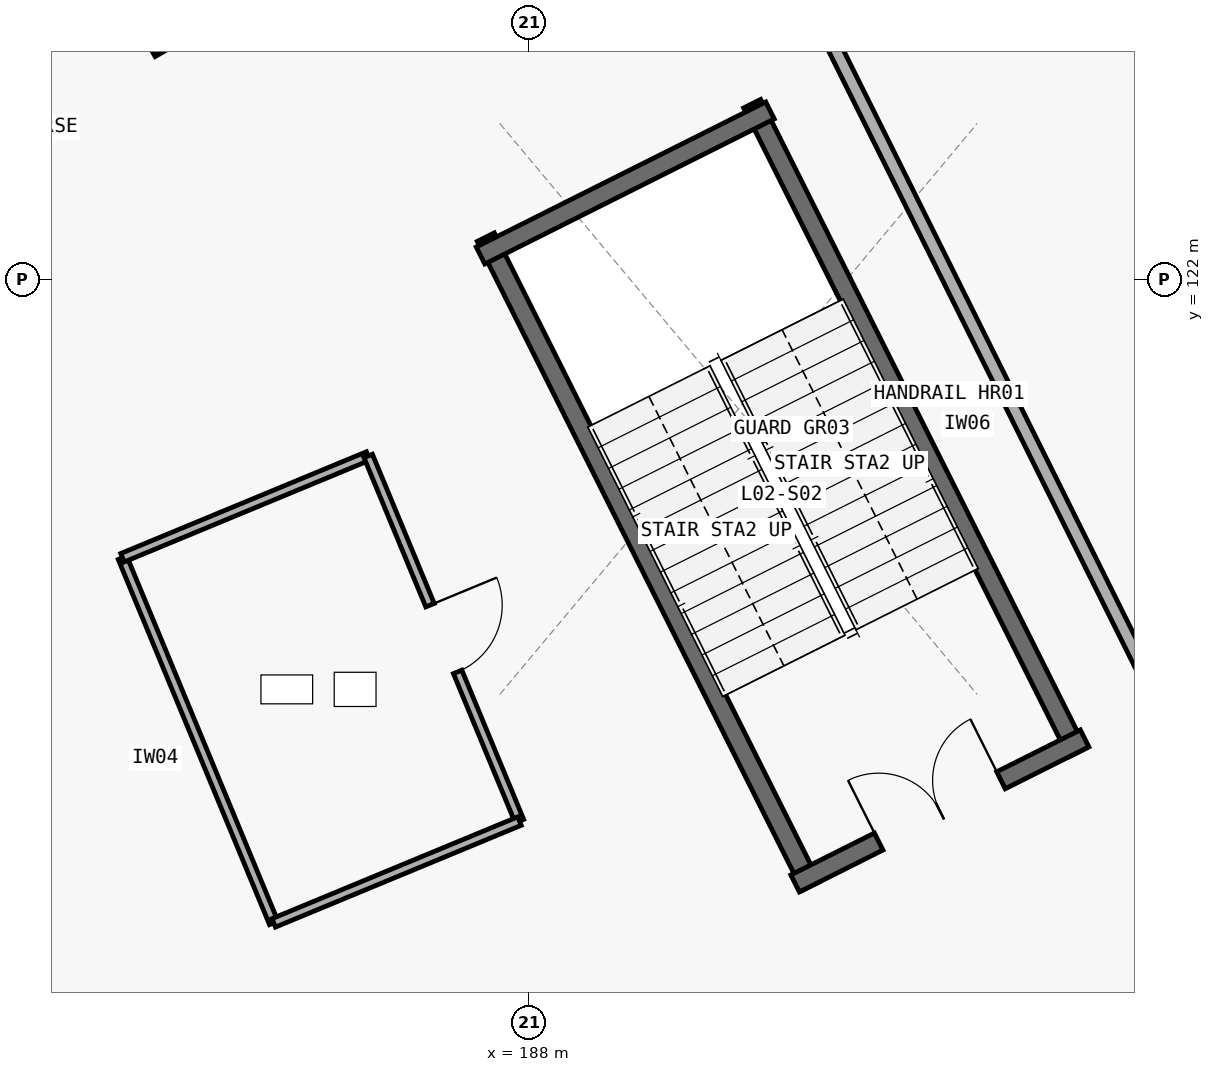
"""IFC4 building model, lengths in metres.
Left out: names, types, materials, properties, quantities, classifications, styles, units other than length and angle.
Written with IfcOpenShell. Run it as: python <this file> out.ifc"""

import sys

from ifc_helpers import new_model, si_unit, direction, frame, frame_2d, origin, origin_2d, place, context, subcontext, project, spatial, rectangle, extrude, element, fill, save


model = new_model("IFC4")
c1 = context("Model", 3, precision=1e-05, world=origin(), true_north=direction((0.0, 1.0)))
c2 = subcontext(c1, "Body", "Model", "MODEL_VIEW")
j1 = project(units=[si_unit("LENGTHUNIT", "METRE"), si_unit("PLANEANGLEUNIT", "RADIAN")], contexts=[c1])
p1 = place(None, origin())
s1 = spatial("IfcSite", under=j1, at=p1, CompositionType="ELEMENT")
p2 = place(p1, origin())
s2 = spatial("IfcBuilding", under=s1, at=p2, CompositionType="ELEMENT")
p3 = place(p2, frame((0.0, 0.0, 10.2)))
s3 = spatial("IfcBuildingStorey", under=s2, at=p3, CompositionType="ELEMENT", Elevation=10.2)
p4 = place(p3, frame((183.274, 125.65, 0.0), z_axis=(0.0, 0.0, 1.0), x_axis=(0.866025403784, 0.5, 0.0)))
e1 = element("IfcColumn", 1, at=p4, inside=s3, PredefinedType="COLUMN", context=c2, shape_type="SweptSolid", body=[
    extrude(rectangle(XDim=1.05, YDim=1.05, at=origin_2d()), origin(), (0.0, 0.0, 1.0), 4.8),
])
for number, where, z_axis, x_axis in (
    (2, (195.215, 115.774, 0.0), (0.0, 0.0, 1.0), (-0.448, 0.894, 0.0)),
    (3, (187.432, 122.557, 0.0), (0.0, 0.0, 1.0), (0.448, -0.894, 0.0)),
):
    element("IfcWall", number, at=place(p3, frame(where, z_axis=z_axis, x_axis=x_axis)), inside=s3, PredefinedType="SHEAR", context=c2, shape_type="SweptSolid", body=[
        extrude(rectangle(XDim=9.55, YDim=0.25, at=frame_2d((4.775, 0.0))), origin(), (0.0, 0.0, 1.0), 4.5),
    ])
p5 = place(p3, frame((191.502, 114.054, 0.0), z_axis=(0.0, 0.0, 1.0), x_axis=(0.89409454548, 0.447878268888, 0.0)))
e4 = element("IfcWall", 4, at=p5, inside=s3, PredefinedType="SHEAR", context=c2, shape_type="SweptSolid", body=[
    extrude(rectangle(XDim=4.26, YDim=0.25, at=frame_2d((2.13, 0.0))), origin(), (0.0, 0.0, 1.0), 4.5),
])
p6 = place(p5, frame((1.23, 0.0, 0.0)))
e5 = element("IfcOpeningElement", 5, at=p6, cuts=e4, PredefinedType="OPENING", context=c2, shape_type="SweptSolid", body=[
    extrude(rectangle(XDim=1.8, YDim=2.25, at=frame_2d((0.9, 1.125))), frame((0.0, 0.135, 0.0), z_axis=(0.0, -1.0, 0.0), x_axis=(1.0, 0.0, 0.0)), (0.0, 0.0, 1.0), 0.27),
])
p7 = place(p3, frame((191.172, 124.223, 0.0), z_axis=(0.0, 0.0, 1.0), x_axis=(-0.89409454548, -0.447878268888, 0.0)))
e6 = element("IfcWall", 6, at=p7, inside=s3, PredefinedType="SHEAR", context=c2, shape_type="SweptSolid", body=[
    extrude(rectangle(XDim=4.26, YDim=0.25, at=frame_2d((2.13, 0.0))), origin(), (0.0, 0.0, 1.0), 4.5),
])
p8 = place(p3, frame((184.642, 113.535, 0.0), z_axis=(0.0, 0.0, 1.0), x_axis=(-0.38268766097, 0.923877780955, 0.0)))
e7 = element("IfcWall", 7, at=p8, inside=s3, PredefinedType="PARTITIONING", context=c2, shape_type="SweptSolid", body=[
    extrude(rectangle(XDim=5.2, YDim=0.12, at=frame_2d((2.6, 0.0))), origin(), (0.0, 0.0, 1.0), 3.113),
])
p9 = place(p3, frame((182.652, 118.339, 0.0), z_axis=(0.0, 0.0, 1.0), x_axis=(0.923904592733, 0.382622926034, 0.0)))
e8 = element("IfcWall", 8, at=p9, inside=s3, PredefinedType="PARTITIONING", context=c2, shape_type="SweptSolid", body=[
    extrude(rectangle(XDim=3.499, YDim=0.12, at=frame_2d((1.75, 0.0))), origin(), (0.0, 0.0, 1.0), 3.815),
])
p10 = place(p3, frame((185.885, 119.678, 0.0), z_axis=(0.0, 0.0, 1.0), x_axis=(0.382704261034, -0.923870904719, 0.0)))
e9 = element("IfcWall", 9, at=p10, inside=s3, PredefinedType="PARTITIONING", context=c2, shape_type="SweptSolid", body=[
    extrude(rectangle(XDim=5.2, YDim=0.12, at=frame_2d((2.6, 0.0))), origin(), (0.0, 0.0, 1.0), 3.113),
])
p11 = place(p10, frame((2.125, 0.0, 0.0)))
e10 = element("IfcOpeningElement", 10, at=p11, cuts=e9, PredefinedType="OPENING", context=c2, shape_type="SweptSolid", body=[
    extrude(rectangle(XDim=0.95, YDim=2.15, at=frame_2d((0.475, 1.075))), frame((0.0, 0.07, 0.0), z_axis=(0.0, -1.0, 0.0), x_axis=(1.0, 0.0, 0.0)), (0.0, 0.0, 1.0), 0.14),
])
p12 = place(p3, frame((187.875, 114.874, 0.0), z_axis=(0.0, 0.0, 1.0), x_axis=(-0.923879927009, -0.382682479961, 0.0)))
e11 = element("IfcWall", 11, at=p12, inside=s3, PredefinedType="PARTITIONING", context=c2, shape_type="SweptSolid", body=[
    extrude(rectangle(XDim=3.499, YDim=0.12, at=frame_2d((1.75, 0.0))), origin(), (0.0, 0.0, 1.0), 4.48),
])
p13 = place(p3, frame((198.616, 111.785, 0.0), z_axis=(0.0, 0.0, 1.0), x_axis=(-0.445193759993, 0.895434261162, 0.0)))
e12 = element("IfcWall", 12, at=p13, inside=s3, PredefinedType="PARTITIONING", context=c2, shape_type="SweptSolid", body=[
    extrude(rectangle(XDim=19.205, YDim=0.18, at=frame_2d((9.603, 0.0))), origin(), (0.0, 0.0, 1.0), 3.565),
])
p14 = place(p6, origin())
e13 = element("IfcDoor", 13, at=p14, inside=s3, OperationType="DOUBLE_DOOR_SINGLE_SWING", PredefinedType="DOOR", context=c2, shape_type="SweptSolid", body=[
    extrude(rectangle(XDim=1.8, YDim=2.25, at=frame_2d((0.9, 1.125))), frame((0.0, 0.025, 0.0), z_axis=(0.0, -1.0, 0.0), x_axis=(1.0, 0.0, 0.0)), (0.0, 0.0, 1.0), 0.05),
])
fill(e5, e13)
p15 = place(p11, origin())
e14 = element("IfcDoor", 14, at=p15, inside=s3, OperationType="SINGLE_SWING_LEFT", PredefinedType="DOOR", context=c2, shape_type="SweptSolid", body=[
    extrude(rectangle(XDim=0.95, YDim=2.15, at=frame_2d((0.475, 1.075))), frame((0.0, 0.025, 0.0), z_axis=(0.0, -1.0, 0.0), x_axis=(1.0, 0.0, 0.0)), (0.0, 0.0, 1.0), 0.05),
])
fill(e10, e14)
save(model, sys.argv[1])
